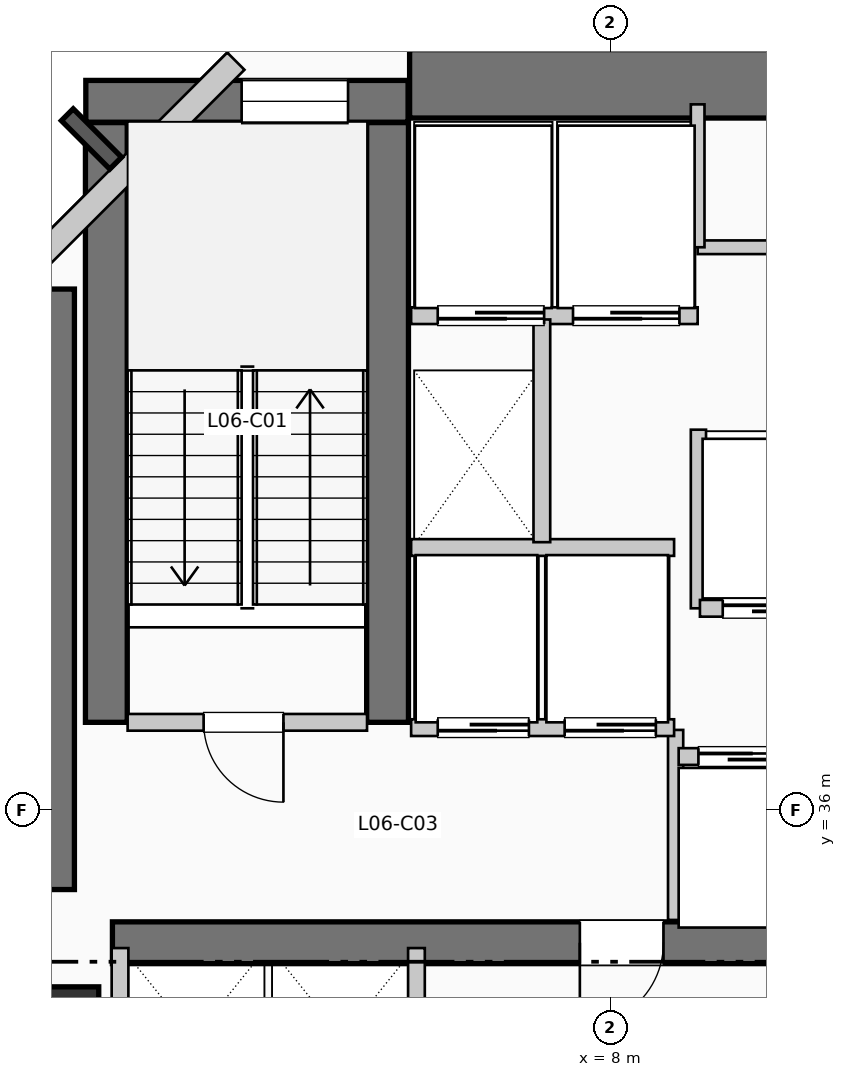
"""IFC4 building model, lengths in metres.
Left out: names, types, materials, properties, quantities, classifications, styles, units other than length and angle.
Written with IfcOpenShell. Run it as: python <this file> out.ifc"""

import sys

from ifc_helpers import new_model, si_unit, direction, frame, frame_2d, origin, origin_2d, place, context, subcontext, project, spatial, rectangle, extrude, element, fill, save


model = new_model("IFC4")
c1 = context("Model", 3, precision=1e-05, world=origin(), true_north=direction((0.0, 1.0)))
c2 = subcontext(c1, "Body", "Model", "MODEL_VIEW")
j1 = project(units=[si_unit("LENGTHUNIT", "METRE"), si_unit("PLANEANGLEUNIT", "RADIAN")], contexts=[c1])
p1 = place(None, origin())
s1 = spatial("IfcSite", under=j1, at=p1, CompositionType="ELEMENT")
p2 = place(p1, origin())
s2 = spatial("IfcBuilding", under=s1, at=p2, CompositionType="ELEMENT")
p3 = place(p2, frame((0.0, 0.0, 30.36)))
s3 = spatial("IfcBuildingStorey", under=s2, at=p3, CompositionType="ELEMENT", Elevation=30.36)
p4 = place(p3, frame((5.36, 45.55, 0.0), z_axis=(0.0, 0.0, 1.0), x_axis=(1.0, 0.0, 0.0)))
e1 = element("IfcWall", 1, at=p4, inside=s3, PredefinedType="SHEAR", context=c2, shape_type="SweptSolid", body=[
    extrude(rectangle(XDim=13.98, YDim=0.9, at=frame_2d((6.99, 0.0))), origin(), (0.0, 0.0, 1.0), 3.96),
])
p5 = place(p3, frame((0.5, 34.95, 0.0), z_axis=(0.0, 0.0, 1.0), x_axis=(0.0, 1.0, 0.0)))
e2 = element("IfcWall", 2, at=p5, inside=s3, PredefinedType="SHEAR", context=c2, shape_type="SweptSolid", body=[
    extrude(rectangle(XDim=7.9, YDim=0.9, at=frame_2d((3.95, 0.0))), origin(), (0.0, 0.0, 1.0), 3.96),
])
p6 = place(p3, frame((1.45, 34.25, 0.0), z_axis=(0.0, 0.0, 1.0), x_axis=(1.0, 0.0, 0.0)))
e3 = element("IfcWall", 3, at=p6, inside=s3, PredefinedType="SHEAR", context=c2, shape_type="SweptSolid", body=[
    extrude(rectangle(XDim=10.71, YDim=0.55, at=frame_2d((5.355, 0.0))), origin(), (0.0, 0.0, 1.0), 3.96),
])
p7 = place(p6, frame((7.25, 0.0, 0.0), z_axis=(0.0, 0.0, 1.0), x_axis=(-1.0, 0.0, 0.0)))
e4 = element("IfcOpeningElement", 4, at=p7, cuts=e3, PredefinedType="OPENING", context=c2, shape_type="SweptSolid", body=[
    extrude(rectangle(XDim=1.1, YDim=2.15, at=frame_2d((0.55, 1.075))), frame((0.0, 0.285, 0.0), z_axis=(0.0, -1.0, 0.0), x_axis=(1.0, 0.0, 0.0)), (0.0, 0.0, 1.0), 0.57),
])
for number, where, z_axis, x_axis in (
    (5, (1.37, 37.15, 0.0), (0.0, 0.0, 1.0), (0.0, 1.0, 0.0)),
    (6, (5.07, 37.15, 0.0), (0.0, 0.0, 1.0), (0.0, 1.0, 0.0)),
):
    element("IfcWall", number, at=place(p3, frame(where, z_axis=z_axis, x_axis=x_axis)), inside=s3, PredefinedType="SHEAR", context=c2, shape_type="SweptSolid", body=[
        extrude(rectangle(XDim=7.89, YDim=0.55, at=frame_2d((3.945, 0.0))), origin(), (0.0, 0.0, 1.0), 3.96),
    ])
p8 = place(p3, frame((1.1, 45.32, 0.0), z_axis=(0.0, 0.0, 1.0), x_axis=(1.0, 0.0, 0.0)))
e7 = element("IfcWall", 7, at=p8, inside=s3, PredefinedType="SHEAR", context=c2, shape_type="SweptSolid", body=[
    extrude(rectangle(XDim=4.24, YDim=0.55, at=frame_2d((2.12, 0.0))), origin(), (0.0, 0.0, 1.0), 3.96),
])
p9 = place(p8, frame((2.05, 0.0, 1.05)))
e8 = element("IfcOpeningElement", 8, at=p9, cuts=e7, PredefinedType="OPENING", context=c2, shape_type="SweptSolid", body=[
    extrude(rectangle(XDim=1.4, YDim=1.8, at=frame_2d((0.7, 0.9))), frame((0.0, 0.285, 0.0), z_axis=(0.0, -1.0, 0.0), x_axis=(1.0, 0.0, 0.0)), (0.0, 0.0, 1.0), 0.57),
])
p10 = place(p3, frame((0.8, 33.2, 0.0), z_axis=(0.0, 0.0, 1.0), x_axis=(1.0, 0.0, 0.0)))
e9 = element("IfcColumn", 9, at=p10, inside=s3, PredefinedType="COLUMN", context=c2, shape_type="SweptSolid", body=[
    extrude(rectangle(XDim=0.94, YDim=0.94, at=origin_2d()), origin(), (0.0, 0.0, 1.0), 3.96),
])
p11 = place(p3, frame((3.074, 45.848, 0.0), z_axis=(0.0, 0.0, 1.0), x_axis=(-0.707106781187, -0.707106781187, 0.0)))
e10 = element("IfcWall", 10, at=p11, inside=s3, PredefinedType="SOLIDWALL", context=c2, shape_type="SweptSolid", body=[
    extrude(rectangle(XDim=4.133, YDim=0.32, at=frame_2d((2.066, 0.0))), origin(), (0.0, 0.0, 1.0), 3.71),
])
p12 = place(p3, frame((1.65, 37.15, 0.0), z_axis=(0.0, 0.0, 1.0), x_axis=(1.0, 0.0, 0.0)))
e11 = element("IfcWall", 11, at=p12, inside=s3, PredefinedType="PARTITIONING", context=c2, shape_type="SweptSolid", body=[
    extrude(rectangle(XDim=3.15, YDim=0.22, at=frame_2d((1.575, 0.0))), origin(), (0.0, 0.0, 1.0), 3.71),
])
p13 = place(p12, frame((2.05, 0.0, 0.0), z_axis=(0.0, 0.0, 1.0), x_axis=(-1.0, 0.0, 0.0)))
e12 = element("IfcOpeningElement", 12, at=p13, cuts=e11, PredefinedType="OPENING", context=c2, shape_type="SweptSolid", body=[
    extrude(rectangle(XDim=1.05, YDim=2.15, at=frame_2d((0.525, 1.075))), frame((0.0, 0.12, 0.0), z_axis=(0.0, -1.0, 0.0), x_axis=(1.0, 0.0, 0.0)), (0.0, 0.0, 1.0), 0.24),
])
p14 = place(p3, frame((8.86, 34.55, 0.0), z_axis=(0.0, 0.0, 1.0), x_axis=(0.0, 1.0, 0.0)))
e13 = element("IfcWall", 13, at=p14, inside=s3, PredefinedType="PARTITIONING", context=c2, shape_type="SweptSolid", body=[
    extrude(rectangle(XDim=2.5, YDim=0.2, at=frame_2d((1.25, 0.0))), origin(), (0.0, 0.0, 1.0), 3.71),
])
p15 = place(p3, frame((5.38, 37.08, 0.0), z_axis=(0.0, 0.0, 1.0), x_axis=(1.0, 0.0, 0.0)))
e14 = element("IfcWall", 14, at=p15, inside=s3, PredefinedType="PARTITIONING", context=c2, shape_type="SweptSolid", body=[
    extrude(rectangle(XDim=3.46, YDim=0.22, at=frame_2d((1.73, 0.0))), origin(), (0.0, 0.0, 1.0), 3.71),
])
p16 = place(p15, frame((1.55, 0.0, 0.0), z_axis=(0.0, 0.0, 1.0), x_axis=(-1.0, 0.0, 0.0)))
e15 = element("IfcOpeningElement", 15, at=p16, cuts=e14, PredefinedType="OPENING", context=c2, shape_type="SweptSolid", body=[
    extrude(rectangle(XDim=1.2, YDim=2.2, at=frame_2d((0.6, 1.1))), frame((0.0, 0.12, 0.0), z_axis=(0.0, -1.0, 0.0), x_axis=(1.0, 0.0, 0.0)), (0.0, 0.0, 1.0), 0.24),
])
p17 = place(p15, frame((3.22, 0.0, 0.0), z_axis=(0.0, 0.0, 1.0), x_axis=(-1.0, 0.0, 0.0)))
e16 = element("IfcOpeningElement", 16, at=p17, cuts=e14, PredefinedType="OPENING", context=c2, shape_type="SweptSolid", body=[
    extrude(rectangle(XDim=1.2, YDim=2.2, at=frame_2d((0.6, 1.1))), frame((0.0, 0.12, 0.0), z_axis=(0.0, -1.0, 0.0), x_axis=(1.0, 0.0, 0.0)), (0.0, 0.0, 1.0), 0.24),
])
p18 = place(p3, frame((5.38, 39.45, 0.0), z_axis=(0.0, 0.0, 1.0), x_axis=(1.0, 0.0, 0.0)))
e17 = element("IfcWall", 17, at=p18, inside=s3, PredefinedType="PARTITIONING", context=c2, shape_type="SweptSolid", body=[
    extrude(rectangle(XDim=3.46, YDim=0.22, at=frame_2d((1.73, 0.0))), origin(), (0.0, 0.0, 1.0), 3.71),
])
p19 = place(p3, frame((5.38, 42.5, 0.0), z_axis=(0.0, 0.0, 1.0), x_axis=(1.0, 0.0, 0.0)))
e18 = element("IfcWall", 18, at=p19, inside=s3, PredefinedType="PARTITIONING", context=c2, shape_type="SweptSolid", body=[
    extrude(rectangle(XDim=3.77, YDim=0.22, at=frame_2d((1.885, 0.0))), origin(), (0.0, 0.0, 1.0), 3.71),
])
p20 = place(p19, frame((1.75, 0.0, 0.0), z_axis=(0.0, 0.0, 1.0), x_axis=(-1.0, 0.0, 0.0)))
e19 = element("IfcOpeningElement", 19, at=p20, cuts=e18, PredefinedType="OPENING", context=c2, shape_type="SweptSolid", body=[
    extrude(rectangle(XDim=1.4, YDim=2.2, at=frame_2d((0.7, 1.1))), frame((0.0, 0.12, 0.0), z_axis=(0.0, -1.0, 0.0), x_axis=(1.0, 0.0, 0.0)), (0.0, 0.0, 1.0), 0.24),
])
p21 = place(p19, frame((3.53, 0.0, 0.0), z_axis=(0.0, 0.0, 1.0), x_axis=(-1.0, 0.0, 0.0)))
e20 = element("IfcOpeningElement", 20, at=p21, cuts=e18, PredefinedType="OPENING", context=c2, shape_type="SweptSolid", body=[
    extrude(rectangle(XDim=1.4, YDim=2.2, at=frame_2d((0.7, 1.1))), frame((0.0, 0.12, 0.0), z_axis=(0.0, -1.0, 0.0), x_axis=(1.0, 0.0, 0.0)), (0.0, 0.0, 1.0), 0.24),
])
p22 = place(p3, frame((7.1, 39.52, 0.0), z_axis=(0.0, 0.0, 1.0), x_axis=(0.0, 1.0, 0.0)))
e21 = element("IfcWall", 21, at=p22, inside=s3, PredefinedType="PARTITIONING", context=c2, shape_type="SweptSolid", body=[
    extrude(rectangle(XDim=2.93, YDim=0.22, at=frame_2d((1.465, 0.0))), origin(), (0.0, 0.0, 1.0), 3.71),
])
for number, where, z_axis, x_axis in (
    (22, (1.55, 31.8, 0.0), (0.0, 0.0, 1.0), (0.0, 1.0, 0.0)),
    (23, (5.45, 31.8, 0.0), (0.0, 0.0, 1.0), (0.0, 1.0, 0.0)),
):
    element("IfcWall", number, at=place(p3, frame(where, z_axis=z_axis, x_axis=x_axis)), inside=s3, PredefinedType="PARTITIONING", context=c2, shape_type="SweptSolid", body=[
        extrude(rectangle(XDim=2.38, YDim=0.22, at=frame_2d((1.19, 0.0))), origin(), (0.0, 0.0, 1.0), 3.71),
    ])
p23 = place(p3, frame((9.16, 38.65, 0.0), z_axis=(0.0, 0.0, 1.0), x_axis=(0.0, 1.0, 0.0)))
e24 = element("IfcWall", 24, at=p23, inside=s3, PredefinedType="PARTITIONING", context=c2, shape_type="SweptSolid", body=[
    extrude(rectangle(XDim=2.35, YDim=0.2, at=frame_2d((1.175, 0.0))), origin(), (0.0, 0.0, 1.0), 3.71),
])
p24 = place(p3, frame((8.9, 36.7, 0.0), z_axis=(0.0, 0.0, 1.0), x_axis=(1.0, 0.0, 0.0)))
e25 = element("IfcWall", 25, at=p24, inside=s3, PredefinedType="PARTITIONING", context=c2, shape_type="SweptSolid", body=[
    extrude(rectangle(XDim=3.26, YDim=0.22, at=frame_2d((1.63, 0.0))), origin(), (0.0, 0.0, 1.0), 3.71),
])
p25 = place(p24, frame((0.26, 0.0, 0.0)))
e26 = element("IfcOpeningElement", 26, at=p25, cuts=e25, PredefinedType="OPENING", context=c2, shape_type="SweptSolid", body=[
    extrude(rectangle(XDim=1.1, YDim=2.2, at=frame_2d((0.55, 1.1))), frame((0.0, 0.12, 0.0), z_axis=(0.0, -1.0, 0.0), x_axis=(1.0, 0.0, 0.0)), (0.0, 0.0, 1.0), 0.24),
])
p26 = place(p24, frame((1.88, 0.0, 0.0)))
e27 = element("IfcOpeningElement", 27, at=p26, cuts=e25, PredefinedType="OPENING", context=c2, shape_type="SweptSolid", body=[
    extrude(rectangle(XDim=1.1, YDim=2.2, at=frame_2d((0.55, 1.1))), frame((0.0, 0.12, 0.0), z_axis=(0.0, -1.0, 0.0), x_axis=(1.0, 0.0, 0.0)), (0.0, 0.0, 1.0), 0.24),
])
p27 = place(p3, frame((9.18, 38.65, 0.0), z_axis=(0.0, 0.0, 1.0), x_axis=(1.0, 0.0, 0.0)))
e28 = element("IfcWall", 28, at=p27, inside=s3, PredefinedType="PARTITIONING", context=c2, shape_type="SweptSolid", body=[
    extrude(rectangle(XDim=3.38, YDim=0.22, at=frame_2d((1.69, 0.0))), origin(), (0.0, 0.0, 1.0), 3.71),
])
p28 = place(p27, frame((0.3, 0.0, 0.0)))
e29 = element("IfcOpeningElement", 29, at=p28, cuts=e28, PredefinedType="OPENING", context=c2, shape_type="SweptSolid", body=[
    extrude(rectangle(XDim=1.1, YDim=2.2, at=frame_2d((0.55, 1.1))), frame((0.0, 0.12, 0.0), z_axis=(0.0, -1.0, 0.0), x_axis=(1.0, 0.0, 0.0)), (0.0, 0.0, 1.0), 0.24),
])
p29 = place(p27, frame((1.95, 0.0, 0.0)))
e30 = element("IfcOpeningElement", 30, at=p29, cuts=e28, PredefinedType="OPENING", context=c2, shape_type="SweptSolid", body=[
    extrude(rectangle(XDim=1.1, YDim=2.2, at=frame_2d((0.55, 1.1))), frame((0.0, 0.12, 0.0), z_axis=(0.0, -1.0, 0.0), x_axis=(1.0, 0.0, 0.0)), (0.0, 0.0, 1.0), 0.24),
])
p30 = place(p3, frame((9.15, 43.4, 0.0), z_axis=(0.0, 0.0, 1.0), x_axis=(1.0, 0.0, 0.0)))
e31 = element("IfcWall", 31, at=p30, inside=s3, PredefinedType="PLUMBINGWALL", context=c2, shape_type="SweptSolid", body=[
    extrude(rectangle(XDim=9.33, YDim=0.18, at=frame_2d((4.665, 0.0))), origin(), (0.0, 0.0, 1.0), 3.71),
])
p31 = place(p30, frame((1.88, 0.0, 0.0)))
e32 = element("IfcOpeningElement", 32, at=p31, cuts=e31, PredefinedType="OPENING", context=c2, shape_type="SweptSolid", body=[
    extrude(rectangle(XDim=0.92, YDim=2.1, at=frame_2d((0.46, 1.05))), frame((0.0, 0.1, 0.0), z_axis=(0.0, -1.0, 0.0), x_axis=(1.0, 0.0, 0.0)), (0.0, 0.0, 1.0), 0.2),
])
p32 = place(p30, frame((6.515, 0.0, 0.0)))
e33 = element("IfcOpeningElement", 33, at=p32, cuts=e31, PredefinedType="OPENING", context=c2, shape_type="SweptSolid", body=[
    extrude(rectangle(XDim=0.92, YDim=2.1, at=frame_2d((0.46, 1.05))), frame((0.0, 0.1, 0.0), z_axis=(0.0, -1.0, 0.0), x_axis=(1.0, 0.0, 0.0)), (0.0, 0.0, 1.0), 0.2),
])
p33 = place(p3, frame((9.15, 43.4, 0.0), z_axis=(0.0, 0.0, 1.0), x_axis=(0.0, 1.0, 0.0)))
e34 = element("IfcWall", 34, at=p33, inside=s3, PredefinedType="PLUMBINGWALL", context=c2, shape_type="SweptSolid", body=[
    extrude(rectangle(XDim=1.88, YDim=0.18, at=frame_2d((0.94, 0.0))), origin(), (0.0, 0.0, 1.0), 3.71),
])
p34 = place(p9, origin())
e35 = element("IfcWindow", 35, at=p34, inside=s3, PartitioningType="SINGLE_PANEL", PredefinedType="WINDOW", context=c2, shape_type="SweptSolid", body=[
    extrude(rectangle(XDim=1.4, YDim=1.8, at=frame_2d((0.7, 0.9))), frame((0.0, 0.03, 0.0), z_axis=(0.0, -1.0, 0.0), x_axis=(1.0, 0.0, 0.0)), (0.0, 0.0, 1.0), 0.06),
])
fill(e8, e35)
p35 = place(p13, origin())
e36 = element("IfcDoor", 36, at=p35, inside=s3, OperationType="SINGLE_SWING_RIGHT", PredefinedType="DOOR", context=c2, shape_type="SweptSolid", body=[
    extrude(rectangle(XDim=1.05, YDim=2.15, at=frame_2d((0.525, 1.075))), frame((0.0, 0.025, 0.0), z_axis=(0.0, -1.0, 0.0), x_axis=(1.0, 0.0, 0.0)), (0.0, 0.0, 1.0), 0.05),
])
fill(e12, e36)
p36 = place(p7, origin())
e37 = element("IfcDoor", 37, at=p36, inside=s3, OperationType="SINGLE_SWING_LEFT", PredefinedType="DOOR", context=c2, shape_type="SweptSolid", body=[
    extrude(rectangle(XDim=1.1, YDim=2.15, at=frame_2d((0.55, 1.075))), frame((0.0, 0.025, 0.0), z_axis=(0.0, -1.0, 0.0), x_axis=(1.0, 0.0, 0.0)), (0.0, 0.0, 1.0), 0.05),
])
fill(e4, e37)
p37 = place(p16, origin())
e38 = element("IfcDoor", 38, at=p37, inside=s3, OperationType="SLIDING_TO_RIGHT", PredefinedType="DOOR", context=c2, shape_type="SweptSolid", body=[
    extrude(rectangle(XDim=1.2, YDim=2.2, at=frame_2d((0.6, 1.1))), frame((0.0, 0.025, 0.0), z_axis=(0.0, -1.0, 0.0), x_axis=(1.0, 0.0, 0.0)), (0.0, 0.0, 1.0), 0.05),
])
fill(e15, e38)
p38 = place(p17, origin())
e39 = element("IfcDoor", 39, at=p38, inside=s3, OperationType="SLIDING_TO_RIGHT", PredefinedType="DOOR", context=c2, shape_type="SweptSolid", body=[
    extrude(rectangle(XDim=1.2, YDim=2.2, at=frame_2d((0.6, 1.1))), frame((0.0, 0.025, 0.0), z_axis=(0.0, -1.0, 0.0), x_axis=(1.0, 0.0, 0.0)), (0.0, 0.0, 1.0), 0.05),
])
fill(e16, e39)
p39 = place(p20, origin())
e40 = element("IfcDoor", 40, at=p39, inside=s3, OperationType="SLIDING_TO_LEFT", PredefinedType="DOOR", context=c2, shape_type="SweptSolid", body=[
    extrude(rectangle(XDim=1.4, YDim=2.2, at=frame_2d((0.7, 1.1))), frame((0.0, 0.025, 0.0), z_axis=(0.0, -1.0, 0.0), x_axis=(1.0, 0.0, 0.0)), (0.0, 0.0, 1.0), 0.05),
])
fill(e19, e40)
p40 = place(p21, origin())
e41 = element("IfcDoor", 41, at=p40, inside=s3, OperationType="SLIDING_TO_LEFT", PredefinedType="DOOR", context=c2, shape_type="SweptSolid", body=[
    extrude(rectangle(XDim=1.4, YDim=2.2, at=frame_2d((0.7, 1.1))), frame((0.0, 0.025, 0.0), z_axis=(0.0, -1.0, 0.0), x_axis=(1.0, 0.0, 0.0)), (0.0, 0.0, 1.0), 0.05),
])
fill(e20, e41)
p41 = place(p25, origin())
e42 = element("IfcDoor", 42, at=p41, inside=s3, OperationType="SLIDING_TO_LEFT", PredefinedType="DOOR", context=c2, shape_type="SweptSolid", body=[
    extrude(rectangle(XDim=1.1, YDim=2.2, at=frame_2d((0.55, 1.1))), frame((0.0, 0.025, 0.0), z_axis=(0.0, -1.0, 0.0), x_axis=(1.0, 0.0, 0.0)), (0.0, 0.0, 1.0), 0.05),
])
fill(e26, e42)
p42 = place(p28, origin())
e43 = element("IfcDoor", 43, at=p42, inside=s3, OperationType="SLIDING_TO_LEFT", PredefinedType="DOOR", context=c2, shape_type="SweptSolid", body=[
    extrude(rectangle(XDim=1.1, YDim=2.2, at=frame_2d((0.55, 1.1))), frame((0.0, 0.025, 0.0), z_axis=(0.0, -1.0, 0.0), x_axis=(1.0, 0.0, 0.0)), (0.0, 0.0, 1.0), 0.05),
])
fill(e29, e43)
save(model, sys.argv[1])
